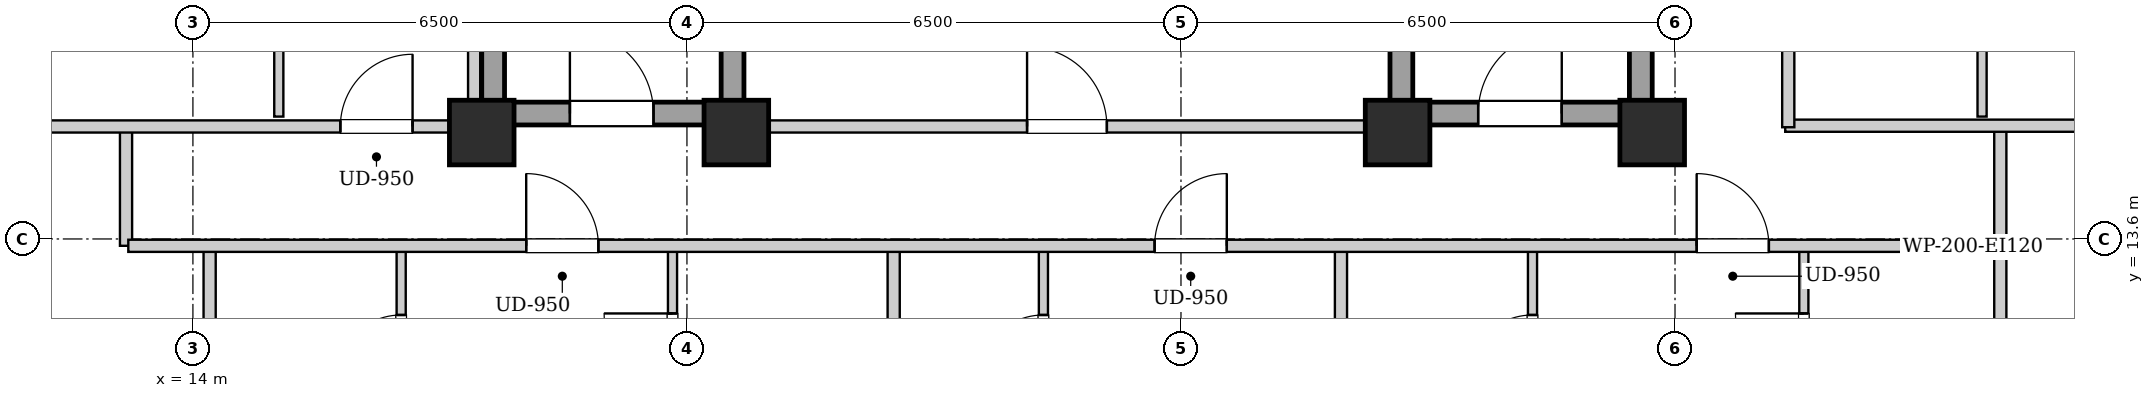
"""IFC4 building model, lengths in metres.
Left out: names, types, materials, properties, quantities, classifications, styles, units other than length and angle.
Written with IfcOpenShell. Run it as: python <this file> out.ifc"""

import sys

from ifc_helpers import new_model, si_unit, direction, frame, frame_2d, origin, origin_2d, place, context, subcontext, project, spatial, rectangle, extrude, element, fill, save


model = new_model("IFC4")
c1 = context("Model", 3, precision=1e-05, world=origin(), true_north=direction((0.0, 1.0)))
c2 = subcontext(c1, "Body", "Model", "MODEL_VIEW")
j1 = project(units=[si_unit("LENGTHUNIT", "METRE"), si_unit("PLANEANGLEUNIT", "RADIAN")], contexts=[c1])
p1 = place(None, origin())
s1 = spatial("IfcSite", under=j1, at=p1, CompositionType="ELEMENT")
p2 = place(p1, origin())
s2 = spatial("IfcBuilding", under=s1, at=p2, CompositionType="ELEMENT")
p3 = place(p2, frame((0.0, 0.0, 214.0)))
s3 = spatial("IfcBuildingStorey", under=s2, at=p3, CompositionType="ELEMENT", Elevation=214.0)
for number, where, z_axis, x_axis in (
    (1, (17.8, 15.0, 0.0), (0.0, 0.0, 1.0), (1.0, 0.0, 0.0)),
    (2, (21.15, 15.0, 0.0), (0.0, 0.0, 1.0), (1.0, 0.0, 0.0)),
    (3, (29.85, 15.0, 0.0), (0.0, 0.0, 1.0), (1.0, 0.0, 0.0)),
    (4, (33.2, 15.0, 0.0), (0.0, 0.0, 1.0), (1.0, 0.0, 0.0)),
):
    element("IfcColumn", number, at=place(p3, frame(where, z_axis=z_axis, x_axis=x_axis)), inside=s3, PredefinedType="COLUMN", context=c2, shape_type="SweptSolid", body=[
        extrude(rectangle(XDim=0.85, YDim=0.85, at=origin_2d()), origin(), (0.0, 0.0, 1.0), 3.3),
    ])
for number, where, z_axis, x_axis in (
    (5, (17.95, 15.1, 0.0), (0.0, 0.0, 1.0), (0.0, 1.0, 0.0)),
    (6, (21.1, 15.1, 0.0), (0.0, 0.0, 1.0), (0.0, 1.0, 0.0)),
):
    element("IfcWall", number, at=place(p3, frame(where, z_axis=z_axis, x_axis=x_axis)), inside=s3, PredefinedType="SHEAR", context=c2, shape_type="SweptSolid", body=[
        extrude(rectangle(XDim=9.0, YDim=0.3, at=frame_2d((4.5, 0.0))), origin(), (0.0, 0.0, 1.0), 3.04),
    ])
p4 = place(p3, frame((18.1, 15.25, 0.0), z_axis=(0.0, 0.0, 1.0), x_axis=(1.0, 0.0, 0.0)))
e7 = element("IfcWall", 7, at=p4, inside=s3, PredefinedType="SHEAR", context=c2, shape_type="SweptSolid", body=[
    extrude(rectangle(XDim=2.85, YDim=0.3, at=frame_2d((1.425, 0.0))), origin(), (0.0, 0.0, 1.0), 3.04),
])
p5 = place(p4, frame((0.86, 0.0, 0.0)))
e8 = element("IfcOpeningElement", 8, at=p5, cuts=e7, PredefinedType="OPENING", context=c2, shape_type="SweptSolid", body=[
    extrude(rectangle(XDim=1.1, YDim=2.05, at=frame_2d((0.55, 1.025))), frame((0.0, 0.16, 0.0), z_axis=(0.0, -1.0, 0.0), x_axis=(1.0, 0.0, 0.0)), (0.0, 0.0, 1.0), 0.32),
])
for number, where, z_axis, x_axis in (
    (9, (29.9, 15.1, 0.0), (0.0, 0.0, 1.0), (0.0, 1.0, 0.0)),
    (10, (33.05, 15.1, 0.0), (0.0, 0.0, 1.0), (0.0, 1.0, 0.0)),
):
    element("IfcWall", number, at=place(p3, frame(where, z_axis=z_axis, x_axis=x_axis)), inside=s3, PredefinedType="SHEAR", context=c2, shape_type="SweptSolid", body=[
        extrude(rectangle(XDim=9.0, YDim=0.3, at=frame_2d((4.5, 0.0))), origin(), (0.0, 0.0, 1.0), 3.04),
    ])
p6 = place(p3, frame((30.05, 15.25, 0.0), z_axis=(0.0, 0.0, 1.0), x_axis=(1.0, 0.0, 0.0)))
e11 = element("IfcWall", 11, at=p6, inside=s3, PredefinedType="SHEAR", context=c2, shape_type="SweptSolid", body=[
    extrude(rectangle(XDim=2.85, YDim=0.3, at=frame_2d((1.425, 0.0))), origin(), (0.0, 0.0, 1.0), 3.04),
])
p7 = place(p6, frame((0.86, 0.0, 0.0)))
e12 = element("IfcOpeningElement", 12, at=p7, cuts=e11, PredefinedType="OPENING", context=c2, shape_type="SweptSolid", body=[
    extrude(rectangle(XDim=1.1, YDim=2.05, at=frame_2d((0.55, 1.025))), frame((0.0, 0.16, 0.0), z_axis=(0.0, -1.0, 0.0), x_axis=(1.0, 0.0, 0.0)), (0.0, 0.0, 1.0), 0.32),
])
p8 = place(p3, frame((21.25, 15.08, 0.0), z_axis=(0.0, 0.0, 1.0), x_axis=(1.0, 0.0, 0.0)))
e13 = element("IfcWall", 13, at=p8, inside=s3, PredefinedType="PARTITIONING", context=c2, shape_type="SweptSolid", body=[
    extrude(rectangle(XDim=8.5, YDim=0.16, at=frame_2d((4.25, 0.0))), origin(), (0.0, 0.0, 1.0), 2.556),
])
p9 = place(p8, frame((3.725, 0.0, 0.0)))
e14 = element("IfcOpeningElement", 14, at=p9, cuts=e13, PredefinedType="OPENING", context=c2, shape_type="SweptSolid", body=[
    extrude(rectangle(XDim=1.05, YDim=2.05, at=frame_2d((0.525, 1.025))), frame((0.0, 0.09, 0.0), z_axis=(0.0, -1.0, 0.0), x_axis=(1.0, 0.0, 0.0)), (0.0, 0.0, 1.0), 0.18),
])
for number, where, z_axis, x_axis in (
    (15, (13.12, 13.51, 0.0), (0.0, 0.0, 1.0), (0.0, 1.0, 0.0)),
    (16, (37.78, 13.51, 0.0), (0.0, 0.0, 1.0), (0.0, 1.0, 0.0)),
):
    element("IfcWall", number, at=place(p3, frame(where, z_axis=z_axis, x_axis=x_axis)), inside=s3, PredefinedType="PARTITIONING", context=c2, shape_type="SweptSolid", body=[
        extrude(rectangle(XDim=1.58, YDim=0.16, at=frame_2d((0.79, 0.0))), origin(), (0.0, 0.0, 1.0), 3.04),
    ])
p10 = place(p3, frame((34.95, 15.09, 0.0), z_axis=(0.0, 0.0, 1.0), x_axis=(1.0, 0.0, 0.0)))
e17 = element("IfcWall", 17, at=p10, inside=s3, PredefinedType="PARTITIONING", context=c2, shape_type="SweptSolid", body=[
    extrude(rectangle(XDim=5.07, YDim=0.16, at=frame_2d((2.535, 0.0))), origin(), (0.0, 0.0, 1.0), 2.556),
])
p11 = place(p3, frame((14.22, 4.08, 0.0), z_axis=(0.0, 0.0, 1.0), x_axis=(0.0, 1.0, 0.0)))
e18 = element("IfcWall", 18, at=p11, inside=s3, PredefinedType="PARTITIONING", context=c2, shape_type="SweptSolid", body=[
    extrude(rectangle(XDim=9.39, YDim=0.16, at=frame_2d((4.695, 0.0))), origin(), (0.0, 0.0, 1.0), 3.04),
])
p12 = place(p3, frame((16.74, 10.87, 0.0), z_axis=(0.0, 0.0, 1.0), x_axis=(0.0, 1.0, 0.0)))
e19 = element("IfcWall", 19, at=p12, inside=s3, PredefinedType="PARTITIONING", context=c2, shape_type="SweptSolid", body=[
    extrude(rectangle(XDim=2.6, YDim=0.12, at=frame_2d((1.3, 0.0))), origin(), (0.0, 0.0, 1.0), 3.04),
])
p13 = place(p12, frame((0.87, 0.0, 0.0)))
e20 = element("IfcOpeningElement", 20, at=p13, cuts=e19, PredefinedType="OPENING", context=c2, shape_type="SweptSolid", body=[
    extrude(rectangle(XDim=0.86, YDim=2.05, at=frame_2d((0.43, 1.025))), frame((0.0, 0.07, 0.0), z_axis=(0.0, -1.0, 0.0), x_axis=(1.0, 0.0, 0.0)), (0.0, 0.0, 1.0), 0.14),
])
p14 = place(p3, frame((20.31, 10.87, 0.0), z_axis=(0.0, 0.0, 1.0), x_axis=(0.0, 1.0, 0.0)))
e21 = element("IfcWall", 21, at=p14, inside=s3, PredefinedType="PARTITIONING", context=c2, shape_type="SweptSolid", body=[
    extrude(rectangle(XDim=2.6, YDim=0.12, at=frame_2d((1.3, 0.0))), origin(), (0.0, 0.0, 1.0), 3.04),
])
p15 = place(p14, frame((0.85, 0.0, 0.0)))
e22 = element("IfcOpeningElement", 22, at=p15, cuts=e21, PredefinedType="OPENING", context=c2, shape_type="SweptSolid", body=[
    extrude(rectangle(XDim=0.9, YDim=2.05, at=frame_2d((0.45, 1.025))), frame((0.0, 0.07, 0.0), z_axis=(0.0, -1.0, 0.0), x_axis=(1.0, 0.0, 0.0)), (0.0, 0.0, 1.0), 0.14),
])
p16 = place(p3, frame((23.22, 4.08, 0.0), z_axis=(0.0, 0.0, 1.0), x_axis=(0.0, 1.0, 0.0)))
e23 = element("IfcWall", 23, at=p16, inside=s3, PredefinedType="PARTITIONING", context=c2, shape_type="SweptSolid", body=[
    extrude(rectangle(XDim=9.39, YDim=0.16, at=frame_2d((4.695, 0.0))), origin(), (0.0, 0.0, 1.0), 3.04),
])
p17 = place(p3, frame((25.19, 10.87, 0.0), z_axis=(0.0, 0.0, 1.0), x_axis=(0.0, 1.0, 0.0)))
e24 = element("IfcWall", 24, at=p17, inside=s3, PredefinedType="PARTITIONING", context=c2, shape_type="SweptSolid", body=[
    extrude(rectangle(XDim=2.6, YDim=0.12, at=frame_2d((1.3, 0.0))), origin(), (0.0, 0.0, 1.0), 3.04),
])
p18 = place(p17, frame((0.87, 0.0, 0.0)))
e25 = element("IfcOpeningElement", 25, at=p18, cuts=e24, PredefinedType="OPENING", context=c2, shape_type="SweptSolid", body=[
    extrude(rectangle(XDim=0.86, YDim=2.05, at=frame_2d((0.43, 1.025))), frame((0.0, 0.07, 0.0), z_axis=(0.0, -1.0, 0.0), x_axis=(1.0, 0.0, 0.0)), (0.0, 0.0, 1.0), 0.14),
])
p19 = place(p3, frame((37.78, 10.81, 0.0), z_axis=(0.0, 0.0, 1.0), x_axis=(0.0, 1.0, 0.0)))
e26 = element("IfcWall", 26, at=p19, inside=s3, PredefinedType="PARTITIONING", context=c2, shape_type="SweptSolid", body=[
    extrude(rectangle(XDim=2.66, YDim=0.16, at=frame_2d((1.33, 0.0))), origin(), (0.0, 0.0, 1.0), 3.04),
])
p20 = place(p3, frame((29.105, 4.08, 0.0), z_axis=(0.0, 0.0, 1.0), x_axis=(0.0, 1.0, 0.0)))
e27 = element("IfcWall", 27, at=p20, inside=s3, PredefinedType="PARTITIONING", context=c2, shape_type="SweptSolid", body=[
    extrude(rectangle(XDim=9.39, YDim=0.16, at=frame_2d((4.695, 0.0))), origin(), (0.0, 0.0, 1.0), 3.04),
])
p21 = place(p3, frame((31.625, 10.87, 0.0), z_axis=(0.0, 0.0, 1.0), x_axis=(0.0, 1.0, 0.0)))
e28 = element("IfcWall", 28, at=p21, inside=s3, PredefinedType="PARTITIONING", context=c2, shape_type="SweptSolid", body=[
    extrude(rectangle(XDim=2.6, YDim=0.12, at=frame_2d((1.3, 0.0))), origin(), (0.0, 0.0, 1.0), 3.04),
])
p22 = place(p21, frame((0.87, 0.0, 0.0)))
e29 = element("IfcOpeningElement", 29, at=p22, cuts=e28, PredefinedType="OPENING", context=c2, shape_type="SweptSolid", body=[
    extrude(rectangle(XDim=0.86, YDim=2.05, at=frame_2d((0.43, 1.025))), frame((0.0, 0.07, 0.0), z_axis=(0.0, -1.0, 0.0), x_axis=(1.0, 0.0, 0.0)), (0.0, 0.0, 1.0), 0.14),
])
p23 = place(p3, frame((35.195, 10.87, 0.0), z_axis=(0.0, 0.0, 1.0), x_axis=(0.0, 1.0, 0.0)))
e30 = element("IfcWall", 30, at=p23, inside=s3, PredefinedType="PARTITIONING", context=c2, shape_type="SweptSolid", body=[
    extrude(rectangle(XDim=2.6, YDim=0.12, at=frame_2d((1.3, 0.0))), origin(), (0.0, 0.0, 1.0), 3.04),
])
p24 = place(p23, frame((0.85, 0.0, 0.0)))
e31 = element("IfcOpeningElement", 31, at=p24, cuts=e30, PredefinedType="OPENING", context=c2, shape_type="SweptSolid", body=[
    extrude(rectangle(XDim=0.9, YDim=2.05, at=frame_2d((0.45, 1.025))), frame((0.0, 0.07, 0.0), z_axis=(0.0, -1.0, 0.0), x_axis=(1.0, 0.0, 0.0)), (0.0, 0.0, 1.0), 0.14),
])
p25 = place(p3, frame((10.88, 15.08, 0.0), z_axis=(0.0, 0.0, 1.0), x_axis=(1.0, 0.0, 0.0)))
e32 = element("IfcWall", 32, at=p25, inside=s3, PredefinedType="PARTITIONING", context=c2, shape_type="SweptSolid", body=[
    extrude(rectangle(XDim=6.88, YDim=0.16, at=frame_2d((3.44, 0.0))), origin(), (0.0, 0.0, 1.0), 2.556),
])
p26 = place(p25, frame((5.06, 0.0, 0.0)))
e33 = element("IfcOpeningElement", 33, at=p26, cuts=e32, PredefinedType="OPENING", context=c2, shape_type="SweptSolid", body=[
    extrude(rectangle(XDim=0.95, YDim=2.1, at=frame_2d((0.475, 1.05))), frame((0.0, 0.09, 0.0), z_axis=(0.0, -1.0, 0.0), x_axis=(1.0, 0.0, 0.0)), (0.0, 0.0, 1.0), 0.18),
])
p27 = place(p3, frame((15.13, 15.21, 0.0), z_axis=(0.0, 0.0, 1.0), x_axis=(0.0, 1.0, 0.0)))
e34 = element("IfcWall", 34, at=p27, inside=s3, PredefinedType="PARTITIONING", context=c2, shape_type="SweptSolid", body=[
    extrude(rectangle(XDim=4.308, YDim=0.12, at=frame_2d((2.154, 0.0))), origin(), (0.0, 0.0, 1.0), 3.04),
])
p28 = place(p27, frame((1.704, 0.0, 0.0)))
e35 = element("IfcOpeningElement", 35, at=p28, cuts=e34, PredefinedType="OPENING", context=c2, shape_type="SweptSolid", body=[
    extrude(rectangle(XDim=0.9, YDim=2.05, at=frame_2d((0.45, 1.025))), frame((0.0, 0.07, 0.0), z_axis=(0.0, -1.0, 0.0), x_axis=(1.0, 0.0, 0.0)), (0.0, 0.0, 1.0), 0.14),
])
p29 = place(p3, frame((37.54, 15.21, 0.0), z_axis=(0.0, 0.0, 1.0), x_axis=(0.0, 1.0, 0.0)))
e36 = element("IfcWall", 36, at=p29, inside=s3, PredefinedType="PARTITIONING", context=c2, shape_type="SweptSolid", body=[
    extrude(rectangle(XDim=1.85, YDim=0.12, at=frame_2d((0.925, 0.0))), origin(), (0.0, 0.0, 1.0), 3.04),
])
p30 = place(p3, frame((13.15, 13.51, 0.0), z_axis=(0.0, 0.0, 1.0), x_axis=(1.0, 0.0, 0.0)))
e37 = element("IfcWall", 37, at=p30, inside=s3, PredefinedType="PARTITIONING", context=c2, shape_type="SweptSolid", body=[
    extrude(rectangle(XDim=24.6, YDim=0.16, at=frame_2d((12.3, 0.0))), origin(), (0.0, 0.0, 1.0), 3.04),
])
p31 = place(p30, frame((5.235, 0.0, 0.0)))
e38 = element("IfcOpeningElement", 38, at=p31, cuts=e37, PredefinedType="OPENING", context=c2, shape_type="SweptSolid", body=[
    extrude(rectangle(XDim=0.95, YDim=2.1, at=frame_2d((0.475, 1.05))), frame((0.0, 0.09, 0.0), z_axis=(0.0, -1.0, 0.0), x_axis=(1.0, 0.0, 0.0)), (0.0, 0.0, 1.0), 0.18),
])
p32 = place(p30, frame((13.503, 0.0, 0.0)))
e39 = element("IfcOpeningElement", 39, at=p32, cuts=e37, PredefinedType="OPENING", context=c2, shape_type="SweptSolid", body=[
    extrude(rectangle(XDim=0.95, YDim=2.1, at=frame_2d((0.475, 1.05))), frame((0.0, 0.09, 0.0), z_axis=(0.0, -1.0, 0.0), x_axis=(1.0, 0.0, 0.0)), (0.0, 0.0, 1.0), 0.18),
])
p33 = place(p30, frame((20.635, 0.0, 0.0)))
e40 = element("IfcOpeningElement", 40, at=p33, cuts=e37, PredefinedType="OPENING", context=c2, shape_type="SweptSolid", body=[
    extrude(rectangle(XDim=0.95, YDim=2.1, at=frame_2d((0.475, 1.05))), frame((0.0, 0.09, 0.0), z_axis=(0.0, -1.0, 0.0), x_axis=(1.0, 0.0, 0.0)), (0.0, 0.0, 1.0), 0.18),
])
p34 = place(p3, frame((17.7, 15.02, 0.0), z_axis=(0.0, 0.0, 1.0), x_axis=(0.0, 1.0, 0.0)))
e41 = element("IfcWall", 41, at=p34, inside=s3, PredefinedType="PARTITIONING", context=c2, shape_type="SweptSolid", body=[
    extrude(rectangle(XDim=13.98, YDim=0.16, at=frame_2d((6.99, 0.0))), origin(), (0.0, 0.0, 1.0), 3.04),
])
p35 = place(p3, frame((34.99, 15.07, 0.0), z_axis=(0.0, 0.0, 1.0), x_axis=(0.0, 1.0, 0.0)))
e42 = element("IfcWall", 42, at=p35, inside=s3, PredefinedType="PARTITIONING", context=c2, shape_type="SweptSolid", body=[
    extrude(rectangle(XDim=13.93, YDim=0.16, at=frame_2d((6.965, 0.0))), origin(), (0.0, 0.0, 1.0), 3.04),
])
p36 = place(p35, frame((3.608, 0.0, 0.0)))
e43 = element("IfcOpeningElement", 43, at=p36, cuts=e42, PredefinedType="OPENING", context=c2, shape_type="SweptSolid", body=[
    extrude(rectangle(XDim=0.95, YDim=2.1, at=frame_2d((0.475, 1.05))), frame((0.0, 0.09, 0.0), z_axis=(0.0, -1.0, 0.0), x_axis=(1.0, 0.0, 0.0)), (0.0, 0.0, 1.0), 0.18),
])
p37 = place(p35, frame((10.649, 0.0, 0.0)))
e44 = element("IfcOpeningElement", 44, at=p37, cuts=e42, PredefinedType="OPENING", context=c2, shape_type="SweptSolid", body=[
    extrude(rectangle(XDim=0.95, YDim=2.1, at=frame_2d((0.475, 1.05))), frame((0.0, 0.09, 0.0), z_axis=(0.0, -1.0, 0.0), x_axis=(1.0, 0.0, 0.0)), (0.0, 0.0, 1.0), 0.18),
])
p38 = place(p5, origin())
e45 = element("IfcDoor", 45, at=p38, inside=s3, OperationType="SINGLE_SWING_LEFT", PredefinedType="DOOR", context=c2, shape_type="SweptSolid", body=[
    extrude(rectangle(XDim=1.1, YDim=2.05, at=frame_2d((0.55, 1.025))), frame((0.0, 0.025, 0.0), z_axis=(0.0, -1.0, 0.0), x_axis=(1.0, 0.0, 0.0)), (0.0, 0.0, 1.0), 0.05),
])
fill(e8, e45)
p39 = place(p7, origin())
e46 = element("IfcDoor", 46, at=p39, inside=s3, OperationType="SINGLE_SWING_RIGHT", PredefinedType="DOOR", context=c2, shape_type="SweptSolid", body=[
    extrude(rectangle(XDim=1.1, YDim=2.05, at=frame_2d((0.55, 1.025))), frame((0.0, 0.025, 0.0), z_axis=(0.0, -1.0, 0.0), x_axis=(1.0, 0.0, 0.0)), (0.0, 0.0, 1.0), 0.05),
])
fill(e12, e46)
p40 = place(p9, origin())
e47 = element("IfcDoor", 47, at=p40, inside=s3, OperationType="SINGLE_SWING_LEFT", PredefinedType="DOOR", context=c2, shape_type="SweptSolid", body=[
    extrude(rectangle(XDim=1.05, YDim=2.05, at=frame_2d((0.525, 1.025))), frame((0.0, 0.025, 0.0), z_axis=(0.0, -1.0, 0.0), x_axis=(1.0, 0.0, 0.0)), (0.0, 0.0, 1.0), 0.05),
])
fill(e14, e47)
p41 = place(p13, origin())
e48 = element("IfcDoor", 48, at=p41, inside=s3, OperationType="SINGLE_SWING_LEFT", PredefinedType="DOOR", context=c2, shape_type="SweptSolid", body=[
    extrude(rectangle(XDim=0.86, YDim=2.05, at=frame_2d((0.43, 1.025))), frame((0.0, 0.025, 0.0), z_axis=(0.0, -1.0, 0.0), x_axis=(1.0, 0.0, 0.0)), (0.0, 0.0, 1.0), 0.05),
])
fill(e20, e48)
p42 = place(p15, origin())
e49 = element("IfcDoor", 49, at=p42, inside=s3, OperationType="SINGLE_SWING_RIGHT", PredefinedType="DOOR", context=c2, shape_type="SweptSolid", body=[
    extrude(rectangle(XDim=0.9, YDim=2.05, at=frame_2d((0.45, 1.025))), frame((0.0, 0.025, 0.0), z_axis=(0.0, -1.0, 0.0), x_axis=(1.0, 0.0, 0.0)), (0.0, 0.0, 1.0), 0.05),
])
fill(e22, e49)
p43 = place(p18, origin())
e50 = element("IfcDoor", 50, at=p43, inside=s3, OperationType="SINGLE_SWING_LEFT", PredefinedType="DOOR", context=c2, shape_type="SweptSolid", body=[
    extrude(rectangle(XDim=0.86, YDim=2.05, at=frame_2d((0.43, 1.025))), frame((0.0, 0.025, 0.0), z_axis=(0.0, -1.0, 0.0), x_axis=(1.0, 0.0, 0.0)), (0.0, 0.0, 1.0), 0.05),
])
fill(e25, e50)
p44 = place(p22, origin())
e51 = element("IfcDoor", 51, at=p44, inside=s3, OperationType="SINGLE_SWING_LEFT", PredefinedType="DOOR", context=c2, shape_type="SweptSolid", body=[
    extrude(rectangle(XDim=0.86, YDim=2.05, at=frame_2d((0.43, 1.025))), frame((0.0, 0.025, 0.0), z_axis=(0.0, -1.0, 0.0), x_axis=(1.0, 0.0, 0.0)), (0.0, 0.0, 1.0), 0.05),
])
fill(e29, e51)
p45 = place(p24, origin())
e52 = element("IfcDoor", 52, at=p45, inside=s3, OperationType="SINGLE_SWING_RIGHT", PredefinedType="DOOR", context=c2, shape_type="SweptSolid", body=[
    extrude(rectangle(XDim=0.9, YDim=2.05, at=frame_2d((0.45, 1.025))), frame((0.0, 0.025, 0.0), z_axis=(0.0, -1.0, 0.0), x_axis=(1.0, 0.0, 0.0)), (0.0, 0.0, 1.0), 0.05),
])
fill(e31, e52)
p46 = place(p26, origin())
e53 = element("IfcDoor", 53, at=p46, inside=s3, OperationType="SINGLE_SWING_RIGHT", PredefinedType="DOOR", context=c2, shape_type="SweptSolid", body=[
    extrude(rectangle(XDim=0.95, YDim=2.1, at=frame_2d((0.475, 1.05))), frame((0.0, 0.025, 0.0), z_axis=(0.0, -1.0, 0.0), x_axis=(1.0, 0.0, 0.0)), (0.0, 0.0, 1.0), 0.05),
])
fill(e33, e53)
p47 = place(p31, origin())
e54 = element("IfcDoor", 54, at=p47, inside=s3, OperationType="SINGLE_SWING_LEFT", PredefinedType="DOOR", context=c2, shape_type="SweptSolid", body=[
    extrude(rectangle(XDim=0.95, YDim=2.1, at=frame_2d((0.475, 1.05))), frame((0.0, 0.025, 0.0), z_axis=(0.0, -1.0, 0.0), x_axis=(1.0, 0.0, 0.0)), (0.0, 0.0, 1.0), 0.05),
])
fill(e38, e54)
p48 = place(p32, origin())
e55 = element("IfcDoor", 55, at=p48, inside=s3, OperationType="SINGLE_SWING_RIGHT", PredefinedType="DOOR", context=c2, shape_type="SweptSolid", body=[
    extrude(rectangle(XDim=0.95, YDim=2.1, at=frame_2d((0.475, 1.05))), frame((0.0, 0.025, 0.0), z_axis=(0.0, -1.0, 0.0), x_axis=(1.0, 0.0, 0.0)), (0.0, 0.0, 1.0), 0.05),
])
fill(e39, e55)
p49 = place(p33, origin())
e56 = element("IfcDoor", 56, at=p49, inside=s3, OperationType="SINGLE_SWING_LEFT", PredefinedType="DOOR", context=c2, shape_type="SweptSolid", body=[
    extrude(rectangle(XDim=0.95, YDim=2.1, at=frame_2d((0.475, 1.05))), frame((0.0, 0.025, 0.0), z_axis=(0.0, -1.0, 0.0), x_axis=(1.0, 0.0, 0.0)), (0.0, 0.0, 1.0), 0.05),
])
fill(e40, e56)
save(model, sys.argv[1])
